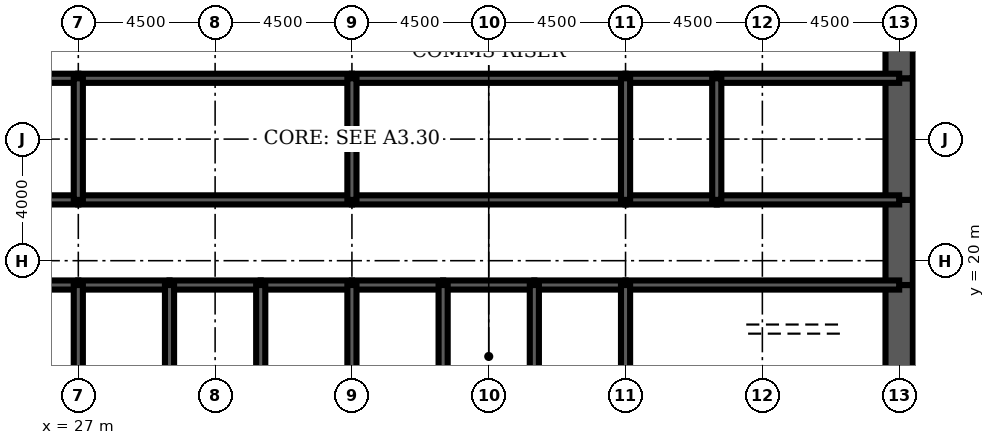
"""IFC4 building model, lengths in metres.
Left out: names, types, materials, properties, quantities, classifications, styles, units other than length and angle.
Written with IfcOpenShell. Run it as: python <this file> out.ifc"""

import sys

from ifc_helpers import new_model, si_unit, direction, frame, frame_2d, origin, place, context, subcontext, project, spatial, rectangle, extrude, element, fill, save


model = new_model("IFC4")
c1 = context("Model", 3, precision=1e-05, world=origin(), true_north=direction((0.0, 1.0)))
c2 = subcontext(c1, "Body", "Model", "MODEL_VIEW")
j1 = project(units=[si_unit("LENGTHUNIT", "METRE"), si_unit("PLANEANGLEUNIT", "RADIAN")], contexts=[c1])
p1 = place(None, origin())
s1 = spatial("IfcSite", under=j1, at=p1, CompositionType="ELEMENT")
p2 = place(p1, origin())
s2 = spatial("IfcBuilding", under=s1, at=p2, CompositionType="ELEMENT")
p3 = place(p2, frame((0.0, 0.0, 129.9)))
s3 = spatial("IfcBuildingStorey", under=s2, at=p3, CompositionType="ELEMENT", Elevation=129.9)
p4 = place(p3, frame((54.0, 16.0, 0.0), z_axis=(0.0, 0.0, 1.0), x_axis=(0.0, 1.0, 0.0)))
e1 = element("IfcWall", 1, at=p4, inside=s3, PredefinedType="SHEAR", context=c2, shape_type="SweptSolid", body=[
    extrude(rectangle(XDim=3.2, YDim=0.9, at=frame_2d((1.6, 0.0))), origin(), (0.0, 0.0, 1.0), 4.2),
])
p5 = place(p3, frame((54.0, 19.2, 0.0), z_axis=(0.0, 0.0, 1.0), x_axis=(0.0, 1.0, 0.0)))
e2 = element("IfcWall", 2, at=p5, inside=s3, PredefinedType="SHEAR", context=c2, shape_type="SweptSolid", body=[
    extrude(rectangle(XDim=2.8, YDim=0.9, at=frame_2d((1.4, 0.0))), origin(), (0.0, 0.0, 1.0), 4.2),
])
p6 = place(p5, frame((0.4, 0.0, 0.0)))
e3 = element("IfcOpeningElement", 3, at=p6, cuts=e2, PredefinedType="OPENING", context=c2, shape_type="SweptSolid", body=[
    extrude(rectangle(XDim=1.8, YDim=2.1, at=frame_2d((0.9, 1.05))), frame((0.0, 0.46, 0.0), z_axis=(0.0, -1.0, 0.0), x_axis=(1.0, 0.0, 0.0)), (0.0, 0.0, 1.0), 0.92),
])
p7 = place(p3, frame((54.0, 22.0, 0.0), z_axis=(0.0, 0.0, 1.0), x_axis=(0.0, 1.0, 0.0)))
e4 = element("IfcWall", 4, at=p7, inside=s3, PredefinedType="SHEAR", context=c2, shape_type="SweptSolid", body=[
    extrude(rectangle(XDim=4.0, YDim=0.9, at=frame_2d((2.0, 0.0))), origin(), (0.0, 0.0, 1.0), 4.2),
])
p8 = place(p3, frame((54.0, 26.0, 0.0), z_axis=(0.0, 0.0, 1.0), x_axis=(0.0, 1.0, 0.0)))
e5 = element("IfcWall", 5, at=p8, inside=s3, PredefinedType="SHEAR", context=c2, shape_type="SweptSolid", body=[
    extrude(rectangle(XDim=2.8, YDim=0.9, at=frame_2d((1.4, 0.0))), origin(), (0.0, 0.0, 1.0), 4.2),
])
p9 = place(p8, frame((0.6, 0.0, 0.0)))
e6 = element("IfcOpeningElement", 6, at=p9, cuts=e5, PredefinedType="OPENING", context=c2, shape_type="SweptSolid", body=[
    extrude(rectangle(XDim=1.8, YDim=2.1, at=frame_2d((0.9, 1.05))), frame((0.0, 0.46, 0.0), z_axis=(0.0, -1.0, 0.0), x_axis=(1.0, 0.0, 0.0)), (0.0, 0.0, 1.0), 0.92),
])
p10 = place(p3, frame((18.0, 19.2, 0.0), z_axis=(0.0, 0.0, 1.0), x_axis=(1.0, 0.0, 0.0)))
e7 = element("IfcWall", 7, at=p10, inside=s3, PredefinedType="SOLIDWALL", context=c2, shape_type="SweptSolid", body=[
    extrude(rectangle(XDim=9.0, YDim=0.3, at=frame_2d((4.5, 0.0))), origin(), (0.0, 0.0, 1.0), 4.2),
])
p11 = place(p10, frame((0.65, 0.0, 0.0)))
e8 = element("IfcOpeningElement", 8, at=p11, cuts=e7, PredefinedType="OPENING", context=c2, shape_type="SweptSolid", body=[
    extrude(rectangle(XDim=1.0, YDim=2.1, at=frame_2d((0.5, 1.05))), frame((0.0, 0.16, 0.0), z_axis=(0.0, -1.0, 0.0), x_axis=(1.0, 0.0, 0.0)), (0.0, 0.0, 1.0), 0.32),
])
p12 = place(p3, frame((27.0, 19.2, 0.0), z_axis=(0.0, 0.0, 1.0), x_axis=(1.0, 0.0, 0.0)))
e9 = element("IfcWall", 9, at=p12, inside=s3, PredefinedType="SOLIDWALL", context=c2, shape_type="SweptSolid", body=[
    extrude(rectangle(XDim=3.0, YDim=0.3, at=frame_2d((1.5, 0.0))), origin(), (0.0, 0.0, 1.0), 4.2),
])
p13 = place(p12, frame((0.95, 0.0, 0.0)))
e10 = element("IfcOpeningElement", 10, at=p13, cuts=e9, PredefinedType="OPENING", context=c2, shape_type="SweptSolid", body=[
    extrude(rectangle(XDim=1.1, YDim=2.2, at=frame_2d((0.55, 1.1))), frame((0.0, 0.16, 0.0), z_axis=(0.0, -1.0, 0.0), x_axis=(1.0, 0.0, 0.0)), (0.0, 0.0, 1.0), 0.32),
])
p14 = place(p3, frame((30.0, 19.2, 0.0), z_axis=(0.0, 0.0, 1.0), x_axis=(1.0, 0.0, 0.0)))
e11 = element("IfcWall", 11, at=p14, inside=s3, PredefinedType="SOLIDWALL", context=c2, shape_type="SweptSolid", body=[
    extrude(rectangle(XDim=3.0, YDim=0.3, at=frame_2d((1.5, 0.0))), origin(), (0.0, 0.0, 1.0), 4.2),
])
p15 = place(p14, frame((0.95, 0.0, 0.0)))
e12 = element("IfcOpeningElement", 12, at=p15, cuts=e11, PredefinedType="OPENING", context=c2, shape_type="SweptSolid", body=[
    extrude(rectangle(XDim=1.1, YDim=2.2, at=frame_2d((0.55, 1.1))), frame((0.0, 0.16, 0.0), z_axis=(0.0, -1.0, 0.0), x_axis=(1.0, 0.0, 0.0)), (0.0, 0.0, 1.0), 0.32),
])
p16 = place(p3, frame((33.0, 19.2, 0.0), z_axis=(0.0, 0.0, 1.0), x_axis=(1.0, 0.0, 0.0)))
e13 = element("IfcWall", 13, at=p16, inside=s3, PredefinedType="SOLIDWALL", context=c2, shape_type="SweptSolid", body=[
    extrude(rectangle(XDim=3.0, YDim=0.3, at=frame_2d((1.5, 0.0))), origin(), (0.0, 0.0, 1.0), 4.2),
])
p17 = place(p16, frame((0.95, 0.0, 0.0)))
e14 = element("IfcOpeningElement", 14, at=p17, cuts=e13, PredefinedType="OPENING", context=c2, shape_type="SweptSolid", body=[
    extrude(rectangle(XDim=1.1, YDim=2.2, at=frame_2d((0.55, 1.1))), frame((0.0, 0.16, 0.0), z_axis=(0.0, -1.0, 0.0), x_axis=(1.0, 0.0, 0.0)), (0.0, 0.0, 1.0), 0.32),
])
p18 = place(p3, frame((36.0, 19.2, 0.0), z_axis=(0.0, 0.0, 1.0), x_axis=(1.0, 0.0, 0.0)))
e15 = element("IfcWall", 15, at=p18, inside=s3, PredefinedType="SOLIDWALL", context=c2, shape_type="SweptSolid", body=[
    extrude(rectangle(XDim=3.0, YDim=0.3, at=frame_2d((1.5, 0.0))), origin(), (0.0, 0.0, 1.0), 4.2),
])
p19 = place(p18, frame((0.95, 0.0, 0.0)))
e16 = element("IfcOpeningElement", 16, at=p19, cuts=e15, PredefinedType="OPENING", context=c2, shape_type="SweptSolid", body=[
    extrude(rectangle(XDim=1.1, YDim=2.2, at=frame_2d((0.55, 1.1))), frame((0.0, 0.16, 0.0), z_axis=(0.0, -1.0, 0.0), x_axis=(1.0, 0.0, 0.0)), (0.0, 0.0, 1.0), 0.32),
])
p20 = place(p3, frame((39.0, 19.2, 0.0), z_axis=(0.0, 0.0, 1.0), x_axis=(1.0, 0.0, 0.0)))
e17 = element("IfcWall", 17, at=p20, inside=s3, PredefinedType="SOLIDWALL", context=c2, shape_type="SweptSolid", body=[
    extrude(rectangle(XDim=3.0, YDim=0.3, at=frame_2d((1.5, 0.0))), origin(), (0.0, 0.0, 1.0), 4.2),
])
p21 = place(p20, frame((1.0, 0.0, 0.0)))
e18 = element("IfcOpeningElement", 18, at=p21, cuts=e17, PredefinedType="OPENING", context=c2, shape_type="SweptSolid", body=[
    extrude(rectangle(XDim=1.0, YDim=2.1, at=frame_2d((0.5, 1.05))), frame((0.0, 0.16, 0.0), z_axis=(0.0, -1.0, 0.0), x_axis=(1.0, 0.0, 0.0)), (0.0, 0.0, 1.0), 0.32),
])
p22 = place(p3, frame((42.0, 19.2, 0.0), z_axis=(0.0, 0.0, 1.0), x_axis=(1.0, 0.0, 0.0)))
e19 = element("IfcWall", 19, at=p22, inside=s3, PredefinedType="SOLIDWALL", context=c2, shape_type="SweptSolid", body=[
    extrude(rectangle(XDim=3.0, YDim=0.3, at=frame_2d((1.5, 0.0))), origin(), (0.0, 0.0, 1.0), 4.2),
])
p23 = place(p3, frame((45.0, 19.2, 0.0), z_axis=(0.0, 0.0, 1.0), x_axis=(1.0, 0.0, 0.0)))
e20 = element("IfcWall", 20, at=p23, inside=s3, PredefinedType="SOLIDWALL", context=c2, shape_type="SweptSolid", body=[
    extrude(rectangle(XDim=9.0, YDim=0.3, at=frame_2d((4.5, 0.0))), origin(), (0.0, 0.0, 1.0), 4.2),
])
p24 = place(p23, frame((7.35, 0.0, 0.0)))
e21 = element("IfcOpeningElement", 21, at=p24, cuts=e20, PredefinedType="OPENING", context=c2, shape_type="SweptSolid", body=[
    extrude(rectangle(XDim=1.0, YDim=2.1, at=frame_2d((0.5, 1.05))), frame((0.0, 0.16, 0.0), z_axis=(0.0, -1.0, 0.0), x_axis=(1.0, 0.0, 0.0)), (0.0, 0.0, 1.0), 0.32),
])
p25 = place(p3, frame((24.0, 22.0, 0.0), z_axis=(0.0, 0.0, 1.0), x_axis=(1.0, 0.0, 0.0)))
e22 = element("IfcWall", 22, at=p25, inside=s3, PredefinedType="SOLIDWALL", context=c2, shape_type="SweptSolid", body=[
    extrude(rectangle(XDim=3.0, YDim=0.3, at=frame_2d((1.5, 0.0))), origin(), (0.0, 0.0, 1.0), 4.2),
])
p26 = place(p25, frame((1.0, 0.0, 0.0)))
e23 = element("IfcOpeningElement", 23, at=p26, cuts=e22, PredefinedType="OPENING", context=c2, shape_type="SweptSolid", body=[
    extrude(rectangle(XDim=1.0, YDim=2.1, at=frame_2d((0.5, 1.05))), frame((0.0, 0.16, 0.0), z_axis=(0.0, -1.0, 0.0), x_axis=(1.0, 0.0, 0.0)), (0.0, 0.0, 1.0), 0.32),
])
p27 = place(p3, frame((27.0, 22.0, 0.0), z_axis=(0.0, 0.0, 1.0), x_axis=(1.0, 0.0, 0.0)))
e24 = element("IfcWall", 24, at=p27, inside=s3, PredefinedType="SOLIDWALL", context=c2, shape_type="SweptSolid", body=[
    extrude(rectangle(XDim=9.0, YDim=0.3, at=frame_2d((4.5, 0.0))), origin(), (0.0, 0.0, 1.0), 4.2),
])
p28 = place(p27, frame((4.0, 0.0, 0.0)))
e25 = element("IfcOpeningElement", 25, at=p28, cuts=e24, PredefinedType="OPENING", context=c2, shape_type="SweptSolid", body=[
    extrude(rectangle(XDim=1.0, YDim=2.1, at=frame_2d((0.5, 1.05))), frame((0.0, 0.16, 0.0), z_axis=(0.0, -1.0, 0.0), x_axis=(1.0, 0.0, 0.0)), (0.0, 0.0, 1.0), 0.32),
])
p29 = place(p3, frame((36.0, 22.0, 0.0), z_axis=(0.0, 0.0, 1.0), x_axis=(1.0, 0.0, 0.0)))
e26 = element("IfcWall", 26, at=p29, inside=s3, PredefinedType="SOLIDWALL", context=c2, shape_type="SweptSolid", body=[
    extrude(rectangle(XDim=9.0, YDim=0.3, at=frame_2d((4.5, 0.0))), origin(), (0.0, 0.0, 1.0), 4.2),
])
p30 = place(p29, frame((4.0, 0.0, 0.0)))
e27 = element("IfcOpeningElement", 27, at=p30, cuts=e26, PredefinedType="OPENING", context=c2, shape_type="SweptSolid", body=[
    extrude(rectangle(XDim=1.0, YDim=2.1, at=frame_2d((0.5, 1.05))), frame((0.0, 0.16, 0.0), z_axis=(0.0, -1.0, 0.0), x_axis=(1.0, 0.0, 0.0)), (0.0, 0.0, 1.0), 0.32),
])
p31 = place(p3, frame((45.0, 22.0, 0.0), z_axis=(0.0, 0.0, 1.0), x_axis=(1.0, 0.0, 0.0)))
e28 = element("IfcWall", 28, at=p31, inside=s3, PredefinedType="SOLIDWALL", context=c2, shape_type="SweptSolid", body=[
    extrude(rectangle(XDim=3.0, YDim=0.3, at=frame_2d((1.5, 0.0))), origin(), (0.0, 0.0, 1.0), 4.2),
])
p32 = place(p31, frame((1.0, 0.0, 0.0)))
e29 = element("IfcOpeningElement", 29, at=p32, cuts=e28, PredefinedType="OPENING", context=c2, shape_type="SweptSolid", body=[
    extrude(rectangle(XDim=1.0, YDim=2.1, at=frame_2d((0.5, 1.05))), frame((0.0, 0.16, 0.0), z_axis=(0.0, -1.0, 0.0), x_axis=(1.0, 0.0, 0.0)), (0.0, 0.0, 1.0), 0.32),
])
p33 = place(p3, frame((48.0, 22.0, 0.0), z_axis=(0.0, 0.0, 1.0), x_axis=(1.0, 0.0, 0.0)))
e30 = element("IfcWall", 30, at=p33, inside=s3, PredefinedType="SOLIDWALL", context=c2, shape_type="SweptSolid", body=[
    extrude(rectangle(XDim=6.0, YDim=0.3, at=frame_2d((3.0, 0.0))), origin(), (0.0, 0.0, 1.0), 4.2),
])
p34 = place(p33, frame((2.0, 0.0, 0.0)))
e31 = element("IfcOpeningElement", 31, at=p34, cuts=e30, PredefinedType="OPENING", context=c2, shape_type="SweptSolid", body=[
    extrude(rectangle(XDim=1.0, YDim=2.1, at=frame_2d((0.5, 1.05))), frame((0.0, 0.16, 0.0), z_axis=(0.0, -1.0, 0.0), x_axis=(1.0, 0.0, 0.0)), (0.0, 0.0, 1.0), 0.32),
])
p35 = place(p33, frame((4.15, 0.0, 0.0)))
e32 = element("IfcOpeningElement", 32, at=p35, cuts=e30, PredefinedType="OPENING", context=c2, shape_type="SweptSolid", body=[
    extrude(rectangle(XDim=1.0, YDim=2.1, at=frame_2d((0.5, 1.05))), frame((0.0, 0.16, 0.0), z_axis=(0.0, -1.0, 0.0), x_axis=(1.0, 0.0, 0.0)), (0.0, 0.0, 1.0), 0.32),
])
p36 = place(p3, frame((24.0, 26.0, 0.0), z_axis=(0.0, 0.0, 1.0), x_axis=(1.0, 0.0, 0.0)))
e33 = element("IfcWall", 33, at=p36, inside=s3, PredefinedType="SOLIDWALL", context=c2, shape_type="SweptSolid", body=[
    extrude(rectangle(XDim=3.0, YDim=0.3, at=frame_2d((1.5, 0.0))), origin(), (0.0, 0.0, 1.0), 4.2),
])
for number, where, z_axis, x_axis in (
    (34, (27.0, 26.0, 0.0), (0.0, 0.0, 1.0), (1.0, 0.0, 0.0)),
    (35, (36.0, 26.0, 0.0), (0.0, 0.0, 1.0), (1.0, 0.0, 0.0)),
):
    element("IfcWall", number, at=place(p3, frame(where, z_axis=z_axis, x_axis=x_axis)), inside=s3, PredefinedType="SOLIDWALL", context=c2, shape_type="SweptSolid", body=[
        extrude(rectangle(XDim=9.0, YDim=0.3, at=frame_2d((4.5, 0.0))), origin(), (0.0, 0.0, 1.0), 4.2),
    ])
p37 = place(p3, frame((45.0, 26.0, 0.0), z_axis=(0.0, 0.0, 1.0), x_axis=(1.0, 0.0, 0.0)))
e36 = element("IfcWall", 36, at=p37, inside=s3, PredefinedType="SOLIDWALL", context=c2, shape_type="SweptSolid", body=[
    extrude(rectangle(XDim=3.0, YDim=0.3, at=frame_2d((1.5, 0.0))), origin(), (0.0, 0.0, 1.0), 4.2),
])
p38 = place(p3, frame((48.0, 26.0, 0.0), z_axis=(0.0, 0.0, 1.0), x_axis=(1.0, 0.0, 0.0)))
e37 = element("IfcWall", 37, at=p38, inside=s3, PredefinedType="SOLIDWALL", context=c2, shape_type="SweptSolid", body=[
    extrude(rectangle(XDim=6.0, YDim=0.3, at=frame_2d((3.0, 0.0))), origin(), (0.0, 0.0, 1.0), 4.2),
])
for number, where, z_axis, x_axis in (
    (38, (27.0, 16.0, 0.0), (0.0, 0.0, 1.0), (0.0, 1.0, 0.0)),
    (39, (30.0, 16.0, 0.0), (0.0, 0.0, 1.0), (0.0, 1.0, 0.0)),
    (40, (33.0, 16.0, 0.0), (0.0, 0.0, 1.0), (0.0, 1.0, 0.0)),
    (41, (36.0, 16.0, 0.0), (0.0, 0.0, 1.0), (0.0, 1.0, 0.0)),
    (42, (39.0, 16.0, 0.0), (0.0, 0.0, 1.0), (0.0, 1.0, 0.0)),
    (43, (42.0, 16.0, 0.0), (0.0, 0.0, 1.0), (0.0, 1.0, 0.0)),
    (44, (45.0, 16.0, 0.0), (0.0, 0.0, 1.0), (0.0, 1.0, 0.0)),
):
    element("IfcWall", number, at=place(p3, frame(where, z_axis=z_axis, x_axis=x_axis)), inside=s3, PredefinedType="SOLIDWALL", context=c2, shape_type="SweptSolid", body=[
        extrude(rectangle(XDim=3.2, YDim=0.3, at=frame_2d((1.6, 0.0))), origin(), (0.0, 0.0, 1.0), 4.2),
    ])
for number, where, z_axis, x_axis in (
    (45, (27.0, 22.0, 0.0), (0.0, 0.0, 1.0), (0.0, 1.0, 0.0)),
    (46, (36.0, 22.0, 0.0), (0.0, 0.0, 1.0), (0.0, 1.0, 0.0)),
    (47, (45.0, 22.0, 0.0), (0.0, 0.0, 1.0), (0.0, 1.0, 0.0)),
    (48, (48.0, 22.0, 0.0), (0.0, 0.0, 1.0), (0.0, 1.0, 0.0)),
):
    element("IfcWall", number, at=place(p3, frame(where, z_axis=z_axis, x_axis=x_axis)), inside=s3, PredefinedType="SOLIDWALL", context=c2, shape_type="SweptSolid", body=[
        extrude(rectangle(XDim=4.0, YDim=0.3, at=frame_2d((2.0, 0.0))), origin(), (0.0, 0.0, 1.0), 4.2),
    ])
p39 = place(p3, frame((39.15, 17.4, 0.0), z_axis=(0.0, 0.0, 1.0), x_axis=(1.0, 0.0, 0.0)))
e49 = element("IfcWall", 49, at=p39, inside=s3, PredefinedType="SOLIDWALL", context=c2, shape_type="SweptSolid", body=[
    extrude(rectangle(XDim=2.7, YDim=0.3, at=frame_2d((1.35, 0.0))), origin(), (0.0, 0.0, 1.0), 4.04),
])
p40 = place(p39, frame((0.85, 0.0, 0.0)))
e50 = element("IfcOpeningElement", 50, at=p40, cuts=e49, PredefinedType="OPENING", context=c2, shape_type="SweptSolid", body=[
    extrude(rectangle(XDim=1.0, YDim=2.1, at=frame_2d((0.5, 1.05))), frame((0.0, 0.16, 0.0), z_axis=(0.0, -1.0, 0.0), x_axis=(1.0, 0.0, 0.0)), (0.0, 0.0, 1.0), 0.32),
])
p41 = place(p3, frame((38.0, 22.15, 0.0), z_axis=(0.0, 0.0, 1.0), x_axis=(0.0, 1.0, 0.0)))
e51 = element("IfcWall", 51, at=p41, inside=s3, PredefinedType="PARTITIONING", context=c2, shape_type="SweptSolid", body=[
    extrude(rectangle(XDim=3.7, YDim=0.15, at=frame_2d((1.85, 0.0))), origin(), (0.0, 0.0, 1.0), 3.0),
])
p42 = place(p41, frame((2.2, 0.0, 0.0)))
e52 = element("IfcOpeningElement", 52, at=p42, cuts=e51, PredefinedType="OPENING", context=c2, shape_type="SweptSolid", body=[
    extrude(rectangle(XDim=1.0, YDim=2.1, at=frame_2d((0.5, 1.05))), frame((0.0, 0.085, 0.0), z_axis=(0.0, -1.0, 0.0), x_axis=(1.0, 0.0, 0.0)), (0.0, 0.0, 1.0), 0.17),
])
p43 = place(p3, frame((51.675, 22.15, 0.0), z_axis=(0.0, 0.0, 1.0), x_axis=(0.0, 1.0, 0.0)))
e53 = element("IfcWall", 53, at=p43, inside=s3, PredefinedType="PARTITIONING", context=c2, shape_type="SweptSolid", body=[
    extrude(rectangle(XDim=3.7, YDim=0.15, at=frame_2d((1.85, 0.0))), origin(), (0.0, 0.0, 1.0), 3.0),
])
p44 = place(p3, frame((49.4, 19.35, 0.0), z_axis=(0.0, 0.0, 1.0), x_axis=(0.0, 1.0, 0.0)))
e54 = element("IfcWall", 54, at=p44, inside=s3, PredefinedType="PARTITIONING", context=c2, shape_type="SweptSolid", body=[
    extrude(rectangle(XDim=2.5, YDim=0.15, at=frame_2d((1.25, 0.0))), origin(), (0.0, 0.0, 1.0), 3.0),
])
p45 = place(p44, frame((1.15, 0.0, 0.0)))
e55 = element("IfcOpeningElement", 55, at=p45, cuts=e54, PredefinedType="OPENING", context=c2, shape_type="SweptSolid", body=[
    extrude(rectangle(XDim=1.0, YDim=2.1, at=frame_2d((0.5, 1.05))), frame((0.0, 0.085, 0.0), z_axis=(0.0, -1.0, 0.0), x_axis=(1.0, 0.0, 0.0)), (0.0, 0.0, 1.0), 0.17),
])
p46 = place(p40, origin())
e56 = element("IfcDoor", 56, at=p46, inside=s3, OperationType="SINGLE_SWING_LEFT", PredefinedType="DOOR", context=c2, shape_type="SweptSolid", body=[
    extrude(rectangle(XDim=1.0, YDim=2.1, at=frame_2d((0.5, 1.05))), frame((0.0, 0.025, 0.0), z_axis=(0.0, -1.0, 0.0), x_axis=(1.0, 0.0, 0.0)), (0.0, 0.0, 1.0), 0.05),
])
fill(e50, e56)
p47 = place(p42, origin())
e57 = element("IfcDoor", 57, at=p47, inside=s3, OperationType="SINGLE_SWING_RIGHT", PredefinedType="DOOR", context=c2, shape_type="SweptSolid", body=[
    extrude(rectangle(XDim=1.0, YDim=2.1, at=frame_2d((0.5, 1.05))), frame((0.0, 0.025, 0.0), z_axis=(0.0, -1.0, 0.0), x_axis=(1.0, 0.0, 0.0)), (0.0, 0.0, 1.0), 0.05),
])
fill(e52, e57)
p48 = place(p45, origin())
e58 = element("IfcDoor", 58, at=p48, inside=s3, OperationType="SINGLE_SWING_RIGHT", PredefinedType="DOOR", context=c2, shape_type="SweptSolid", body=[
    extrude(rectangle(XDim=1.0, YDim=2.1, at=frame_2d((0.5, 1.05))), frame((0.0, 0.025, 0.0), z_axis=(0.0, -1.0, 0.0), x_axis=(1.0, 0.0, 0.0)), (0.0, 0.0, 1.0), 0.05),
])
fill(e55, e58)
p49 = place(p13, origin())
e59 = element("IfcDoor", 59, at=p49, inside=s3, OperationType="DOUBLE_DOOR_SLIDING", PredefinedType="USERDEFINED", context=c2, shape_type="SweptSolid", body=[
    extrude(rectangle(XDim=1.1, YDim=2.2, at=frame_2d((0.55, 1.1))), frame((0.0, 0.025, 0.0), z_axis=(0.0, -1.0, 0.0), x_axis=(1.0, 0.0, 0.0)), (0.0, 0.0, 1.0), 0.05),
])
fill(e10, e59)
p50 = place(p15, origin())
e60 = element("IfcDoor", 60, at=p50, inside=s3, OperationType="DOUBLE_DOOR_SLIDING", PredefinedType="USERDEFINED", context=c2, shape_type="SweptSolid", body=[
    extrude(rectangle(XDim=1.1, YDim=2.2, at=frame_2d((0.55, 1.1))), frame((0.0, 0.025, 0.0), z_axis=(0.0, -1.0, 0.0), x_axis=(1.0, 0.0, 0.0)), (0.0, 0.0, 1.0), 0.05),
])
fill(e12, e60)
p51 = place(p17, origin())
e61 = element("IfcDoor", 61, at=p51, inside=s3, OperationType="DOUBLE_DOOR_SLIDING", PredefinedType="USERDEFINED", context=c2, shape_type="SweptSolid", body=[
    extrude(rectangle(XDim=1.1, YDim=2.2, at=frame_2d((0.55, 1.1))), frame((0.0, 0.025, 0.0), z_axis=(0.0, -1.0, 0.0), x_axis=(1.0, 0.0, 0.0)), (0.0, 0.0, 1.0), 0.05),
])
fill(e14, e61)
p52 = place(p19, origin())
e62 = element("IfcDoor", 62, at=p52, inside=s3, OperationType="DOUBLE_DOOR_SLIDING", PredefinedType="USERDEFINED", context=c2, shape_type="SweptSolid", body=[
    extrude(rectangle(XDim=1.1, YDim=2.2, at=frame_2d((0.55, 1.1))), frame((0.0, 0.025, 0.0), z_axis=(0.0, -1.0, 0.0), x_axis=(1.0, 0.0, 0.0)), (0.0, 0.0, 1.0), 0.05),
])
fill(e16, e62)
p53 = place(p24, origin())
e63 = element("IfcDoor", 63, at=p53, inside=s3, OperationType="SINGLE_SWING_RIGHT", PredefinedType="DOOR", context=c2, shape_type="SweptSolid", body=[
    extrude(rectangle(XDim=1.0, YDim=2.1, at=frame_2d((0.5, 1.05))), frame((0.0, 0.025, 0.0), z_axis=(0.0, -1.0, 0.0), x_axis=(1.0, 0.0, 0.0)), (0.0, 0.0, 1.0), 0.05),
])
fill(e21, e63)
p54 = place(p6, origin())
e64 = element("IfcDoor", 64, at=p54, inside=s3, OperationType="SINGLE_SWING_LEFT", PredefinedType="DOOR", context=c2, shape_type="SweptSolid", body=[
    extrude(rectangle(XDim=1.8, YDim=2.1, at=frame_2d((0.9, 1.05))), frame((0.0, 0.45, 0.0), z_axis=(0.0, -1.0, 0.0), x_axis=(1.0, 0.0, 0.0)), (0.0, 0.0, 1.0), 0.899),
])
fill(e3, e64)
p55 = place(p9, origin())
e65 = element("IfcDoor", 65, at=p55, inside=s3, OperationType="SINGLE_SWING_LEFT", PredefinedType="DOOR", context=c2, shape_type="SweptSolid", body=[
    extrude(rectangle(XDim=1.8, YDim=2.1, at=frame_2d((0.9, 1.05))), frame((0.0, 0.45, 0.0), z_axis=(0.0, -1.0, 0.0), x_axis=(1.0, 0.0, 0.0)), (0.0, 0.0, 1.0), 0.899),
])
fill(e6, e65)
p56 = place(p28, origin())
e66 = element("IfcDoor", 66, at=p56, inside=s3, OperationType="SINGLE_SWING_LEFT", PredefinedType="DOOR", context=c2, shape_type="SweptSolid", body=[
    extrude(rectangle(XDim=1.0, YDim=2.1, at=frame_2d((0.5, 1.05))), frame((0.0, 0.025, 0.0), z_axis=(0.0, -1.0, 0.0), x_axis=(1.0, 0.0, 0.0)), (0.0, 0.0, 1.0), 0.05),
])
fill(e25, e66)
p57 = place(p30, origin())
e67 = element("IfcDoor", 67, at=p57, inside=s3, OperationType="SINGLE_SWING_LEFT", PredefinedType="DOOR", context=c2, shape_type="SweptSolid", body=[
    extrude(rectangle(XDim=1.0, YDim=2.1, at=frame_2d((0.5, 1.05))), frame((0.0, 0.025, 0.0), z_axis=(0.0, -1.0, 0.0), x_axis=(1.0, 0.0, 0.0)), (0.0, 0.0, 1.0), 0.05),
])
fill(e27, e67)
p58 = place(p32, origin())
e68 = element("IfcDoor", 68, at=p58, inside=s3, OperationType="SINGLE_SWING_LEFT", PredefinedType="DOOR", context=c2, shape_type="SweptSolid", body=[
    extrude(rectangle(XDim=1.0, YDim=2.1, at=frame_2d((0.5, 1.05))), frame((0.0, 0.025, 0.0), z_axis=(0.0, -1.0, 0.0), x_axis=(1.0, 0.0, 0.0)), (0.0, 0.0, 1.0), 0.05),
])
fill(e29, e68)
p59 = place(p34, origin())
e69 = element("IfcDoor", 69, at=p59, inside=s3, OperationType="SINGLE_SWING_LEFT", PredefinedType="DOOR", context=c2, shape_type="SweptSolid", body=[
    extrude(rectangle(XDim=1.0, YDim=2.1, at=frame_2d((0.5, 1.05))), frame((0.0, 0.025, 0.0), z_axis=(0.0, -1.0, 0.0), x_axis=(1.0, 0.0, 0.0)), (0.0, 0.0, 1.0), 0.05),
])
fill(e31, e69)
p60 = place(p35, origin())
e70 = element("IfcDoor", 70, at=p60, inside=s3, OperationType="SINGLE_SWING_RIGHT", PredefinedType="DOOR", context=c2, shape_type="SweptSolid", body=[
    extrude(rectangle(XDim=1.0, YDim=2.1, at=frame_2d((0.5, 1.05))), frame((0.0, 0.025, 0.0), z_axis=(0.0, -1.0, 0.0), x_axis=(1.0, 0.0, 0.0)), (0.0, 0.0, 1.0), 0.05),
])
fill(e32, e70)
p61 = place(p21, origin())
e71 = element("IfcDoor", 71, at=p61, inside=s3, OperationType="SINGLE_SWING_LEFT", PredefinedType="DOOR", context=c2, shape_type="SweptSolid", body=[
    extrude(rectangle(XDim=1.0, YDim=2.1, at=frame_2d((0.5, 1.05))), frame((0.0, 0.025, 0.0), z_axis=(0.0, -1.0, 0.0), x_axis=(1.0, 0.0, 0.0)), (0.0, 0.0, 1.0), 0.05),
])
fill(e18, e71)
save(model, sys.argv[1])
